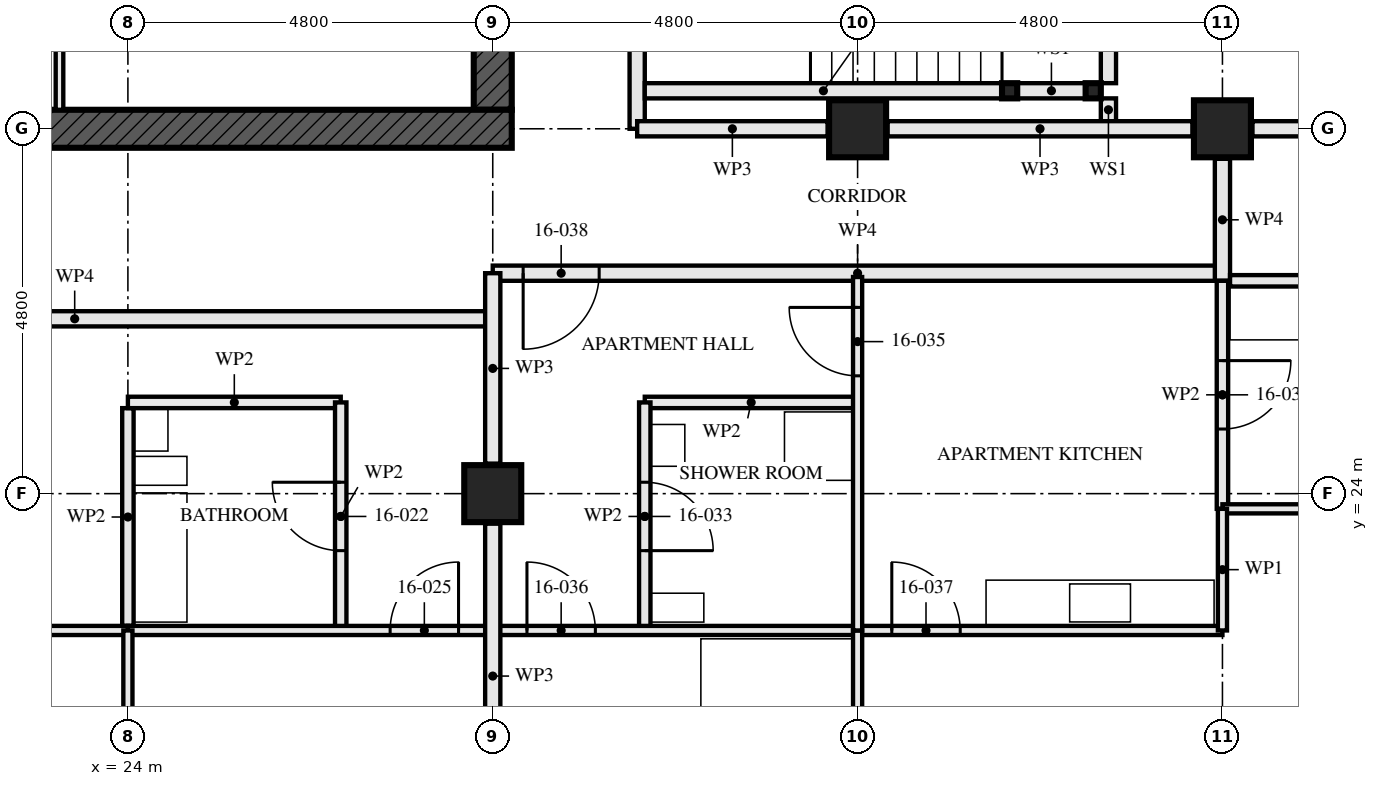
"""IFC4 building model, lengths in metres.
Left out: names, types, materials, properties, quantities, classifications, styles, units other than length and angle.
Written with IfcOpenShell. Run it as: python <this file> out.ifc"""

import sys

from ifc_helpers import new_model, si_unit, direction, frame, frame_2d, origin, origin_2d, place, context, subcontext, project, spatial, rectangle, hollow_rectangle, extrude, element, fill, save


model = new_model("IFC4")
c1 = context("Model", 3, precision=1e-05, world=origin(), true_north=direction((0.0, 1.0)))
c2 = subcontext(c1, "Body", "Model", "MODEL_VIEW")
j1 = project(units=[si_unit("LENGTHUNIT", "METRE"), si_unit("PLANEANGLEUNIT", "RADIAN")], contexts=[c1])
p1 = place(None, origin())
s1 = spatial("IfcSite", under=j1, at=p1, CompositionType="ELEMENT")
p2 = place(p1, origin())
s2 = spatial("IfcBuilding", under=s1, at=p2, CompositionType="ELEMENT")
p3 = place(p2, frame((0.0, 0.0, 62.0)))
s3 = spatial("IfcBuildingStorey", under=s2, at=p3, CompositionType="ELEMENT", Elevation=62.0)
for number, where, z_axis, x_axis in (
    (1, (28.8, 24.0, 0.0), (0.0, 0.0, 1.0), (1.0, 0.0, 0.0)),
    (2, (33.6, 28.8, 0.0), (0.0, 0.0, 1.0), (0.0, 1.0, 0.0)),
    (3, (38.4, 28.8, 0.0), (0.0, 0.0, 1.0), (0.0, 1.0, 0.0)),
):
    element("IfcColumn", number, at=place(p3, frame(where, z_axis=z_axis, x_axis=x_axis)), inside=s3, PredefinedType="COLUMN", context=c2, shape_type="SweptSolid", body=[
        extrude(hollow_rectangle(XDim=0.75, YDim=0.75, WallThickness=0.08, at=origin_2d()), origin(), (0.0, 0.0, 1.0), 3.5),
    ])
p4 = place(p3, frame((14.15, 28.8, -0.17), z_axis=(0.0, 0.0, 1.0), x_axis=(1.0, 0.0, 0.0)))
e4 = element("IfcWall", 4, at=p4, inside=s3, PredefinedType="SHEAR", context=c2, shape_type="SweptSolid", body=[
    extrude(rectangle(XDim=14.9, YDim=0.5, at=frame_2d((7.45, 0.0))), origin(), (0.0, 0.0, 1.0), 3.5),
])
p5 = place(p4, frame((6.85, 0.0, 0.17)))
e5 = element("IfcOpeningElement", 5, at=p5, cuts=e4, PredefinedType="OPENING", context=c2, shape_type="SweptSolid", body=[
    extrude(rectangle(XDim=1.2, YDim=2.1, at=frame_2d((0.6, 1.05))), frame((0.0, 0.26, 0.0), z_axis=(0.0, -1.0, 0.0), x_axis=(1.0, 0.0, 0.0)), (0.0, 0.0, 1.0), 0.521),
])
p6 = place(p3, frame((28.8, 29.05, -0.17), z_axis=(0.0, 0.0, 1.0), x_axis=(0.0, 1.0, 0.0)))
e6 = element("IfcWall", 6, at=p6, inside=s3, PredefinedType="SHEAR", context=c2, shape_type="SweptSolid", body=[
    extrude(rectangle(XDim=13.9, YDim=0.5, at=frame_2d((6.95, 0.0))), origin(), (0.0, 0.0, 1.0), 3.5),
])
p7 = place(p6, frame((6.35, 0.0, 0.17)))
e7 = element("IfcOpeningElement", 7, at=p7, cuts=e6, PredefinedType="OPENING", context=c2, shape_type="SweptSolid", body=[
    extrude(rectangle(XDim=1.2, YDim=2.1, at=frame_2d((0.6, 1.05))), frame((0.0, 0.26, 0.0), z_axis=(0.0, -1.0, 0.0), x_axis=(1.0, 0.0, 0.0)), (0.0, 0.0, 1.0), 0.521),
])
for number, where, z_axis, x_axis in (
    (8, (36.7, 29.3, 0.0), (0.0, 0.0, 1.0), (1.0, 0.0, 0.0)),
    (9, (35.6, 29.3, 0.0), (0.0, 0.0, 1.0), (1.0, 0.0, 0.0)),
):
    element("IfcColumn", number, at=place(p3, frame(where, z_axis=z_axis, x_axis=x_axis)), inside=s3, PredefinedType="COLUMN", context=c2, shape_type="SweptSolid", body=[
        extrude(hollow_rectangle(XDim=0.2, YDim=0.2, WallThickness=0.008, at=origin_2d()), origin(), (0.0, 0.0, 1.0), 3.33),
    ])
p8 = place(p3, frame((26.8, 22.2, 0.0), z_axis=(0.0, 0.0, 1.0), x_axis=(0.0, 1.0, 0.0)))
e10 = element("IfcWall", 10, at=p8, inside=s3, PredefinedType="PARTITIONING", context=c2, shape_type="SweptSolid", body=[
    extrude(rectangle(XDim=3.0, YDim=0.15, at=frame_2d((1.5, 0.0))), origin(), (0.0, 0.0, 1.0), 2.55),
])
p9 = place(p8, frame((1.05, 0.0, 0.0)))
e11 = element("IfcOpeningElement", 11, at=p9, cuts=e10, PredefinedType="OPENING", context=c2, shape_type="SweptSolid", body=[
    extrude(rectangle(XDim=0.9, YDim=2.1, at=frame_2d((0.45, 1.05))), frame((0.0, 0.085, 0.0), z_axis=(0.0, -1.0, 0.0), x_axis=(1.0, 0.0, 0.0)), (0.0, 0.0, 1.0), 0.171),
])
p10 = place(p3, frame((24.0, 25.2, 0.0), z_axis=(0.0, 0.0, 1.0), x_axis=(1.0, 0.0, 0.0)))
e12 = element("IfcWall", 12, at=p10, inside=s3, PredefinedType="PARTITIONING", context=c2, shape_type="SweptSolid", body=[
    extrude(rectangle(XDim=2.8, YDim=0.15, at=frame_2d((1.4, 0.0))), origin(), (0.0, 0.0, 1.0), 3.33),
])
p11 = place(p3, frame((19.2, 22.2, 0.0), z_axis=(0.0, 0.0, 1.0), x_axis=(1.0, 0.0, 0.0)))
e13 = element("IfcWall", 13, at=p11, inside=s3, PredefinedType="PARTITIONING", context=c2, shape_type="SweptSolid", body=[
    extrude(rectangle(XDim=4.8, YDim=0.12, at=frame_2d((2.4, 0.0))), origin(), (0.0, 0.0, 1.0), 3.33),
])
p12 = place(p11, frame((0.45, 0.0, 0.0)))
e14 = element("IfcOpeningElement", 14, at=p12, cuts=e13, PredefinedType="OPENING", context=c2, shape_type="SweptSolid", body=[
    extrude(rectangle(XDim=0.9, YDim=2.1, at=frame_2d((0.45, 1.05))), frame((0.0, 0.071, 0.0), z_axis=(0.0, -1.0, 0.0), x_axis=(1.0, 0.0, 0.0)), (0.0, 0.0, 1.0), 0.141),
])
p13 = place(p3, frame((24.0, 22.2, 0.0), z_axis=(0.0, 0.0, 1.0), x_axis=(1.0, 0.0, 0.0)))
e15 = element("IfcWall", 15, at=p13, inside=s3, PredefinedType="PARTITIONING", context=c2, shape_type="SweptSolid", body=[
    extrude(rectangle(XDim=4.8, YDim=0.12, at=frame_2d((2.4, 0.0))), origin(), (0.0, 0.0, 1.0), 3.33),
])
p14 = place(p13, frame((3.45, 0.0, 0.0)))
e16 = element("IfcOpeningElement", 16, at=p14, cuts=e15, PredefinedType="OPENING", context=c2, shape_type="SweptSolid", body=[
    extrude(rectangle(XDim=0.9, YDim=2.1, at=frame_2d((0.45, 1.05))), frame((0.0, 0.071, 0.0), z_axis=(0.0, -1.0, 0.0), x_axis=(1.0, 0.0, 0.0)), (0.0, 0.0, 1.0), 0.141),
])
p15 = place(p3, frame((24.0, 14.795, 0.0), z_axis=(0.0, 0.0, 1.0), x_axis=(0.0, 1.0, 0.0)))
e17 = element("IfcWall", 17, at=p15, inside=s3, PredefinedType="PARTITIONING", context=c2, shape_type="SweptSolid", body=[
    extrude(rectangle(XDim=7.405, YDim=0.12, at=frame_2d((3.703, 0.0))), origin(), (0.0, 0.0, 1.0), 2.55),
])
p16 = place(p3, frame((17.8, 26.3, 0.0), z_axis=(0.0, 0.0, 1.0), x_axis=(1.0, 0.0, 0.0)))
e18 = element("IfcWall", 18, at=p16, inside=s3, PredefinedType="PARTITIONING", context=c2, shape_type="SweptSolid", body=[
    extrude(rectangle(XDim=11.0, YDim=0.2, at=frame_2d((5.5, 0.0))), origin(), (0.0, 0.0, 1.0), 2.55),
])
p17 = place(p16, frame((0.06, 0.0, 0.0)))
e19 = element("IfcOpeningElement", 19, at=p17, cuts=e18, PredefinedType="OPENING", context=c2, shape_type="SweptSolid", body=[
    extrude(rectangle(XDim=1.0, YDim=2.1, at=frame_2d((0.5, 1.05))), frame((0.0, 0.111, 0.0), z_axis=(0.0, -1.0, 0.0), x_axis=(1.0, 0.0, 0.0)), (0.0, 0.0, 1.0), 0.221),
])
p18 = place(p3, frame((30.8, 22.2, 0.0), z_axis=(0.0, 0.0, 1.0), x_axis=(0.0, 1.0, 0.0)))
e20 = element("IfcWall", 20, at=p18, inside=s3, PredefinedType="PARTITIONING", context=c2, shape_type="SweptSolid", body=[
    extrude(rectangle(XDim=3.0, YDim=0.15, at=frame_2d((1.5, 0.0))), origin(), (0.0, 0.0, 1.0), 2.55),
])
p19 = place(p18, frame((1.05, 0.0, 0.0)))
e21 = element("IfcOpeningElement", 21, at=p19, cuts=e20, PredefinedType="OPENING", context=c2, shape_type="SweptSolid", body=[
    extrude(rectangle(XDim=0.9, YDim=2.1, at=frame_2d((0.45, 1.05))), frame((0.0, 0.085, 0.0), z_axis=(0.0, -1.0, 0.0), x_axis=(1.0, 0.0, 0.0)), (0.0, 0.0, 1.0), 0.171),
])
p20 = place(p3, frame((30.8, 25.2, 0.0), z_axis=(0.0, 0.0, 1.0), x_axis=(1.0, 0.0, 0.0)))
e22 = element("IfcWall", 22, at=p20, inside=s3, PredefinedType="PARTITIONING", context=c2, shape_type="SweptSolid", body=[
    extrude(rectangle(XDim=2.8, YDim=0.15, at=frame_2d((1.4, 0.0))), origin(), (0.0, 0.0, 1.0), 3.33),
])
p21 = place(p3, frame((38.4, 23.8, 0.0), z_axis=(0.0, 0.0, 1.0), x_axis=(0.0, 1.0, 0.0)))
e23 = element("IfcWall", 23, at=p21, inside=s3, PredefinedType="PARTITIONING", context=c2, shape_type="SweptSolid", body=[
    extrude(rectangle(XDim=3.0, YDim=0.15, at=frame_2d((1.5, 0.0))), origin(), (0.0, 0.0, 1.0), 2.55),
])
p22 = place(p21, frame((1.05, 0.0, 0.0)))
e24 = element("IfcOpeningElement", 24, at=p22, cuts=e23, PredefinedType="OPENING", context=c2, shape_type="SweptSolid", body=[
    extrude(rectangle(XDim=0.9, YDim=2.1, at=frame_2d((0.45, 1.05))), frame((0.0, 0.085, 0.0), z_axis=(0.0, -1.0, 0.0), x_axis=(1.0, 0.0, 0.0)), (0.0, 0.0, 1.0), 0.171),
])
p23 = place(p3, frame((33.6, 22.2, 0.0), z_axis=(0.0, 0.0, 1.0), x_axis=(0.0, 1.0, 0.0)))
e25 = element("IfcWall", 25, at=p23, inside=s3, PredefinedType="PARTITIONING", context=c2, shape_type="SweptSolid", body=[
    extrude(rectangle(XDim=4.65, YDim=0.12, at=frame_2d((2.325, 0.0))), origin(), (0.0, 0.0, 1.0), 2.55),
])
p24 = place(p23, frame((3.35, 0.0, 0.0)))
e26 = element("IfcOpeningElement", 26, at=p24, cuts=e25, PredefinedType="OPENING", context=c2, shape_type="SweptSolid", body=[
    extrude(rectangle(XDim=0.9, YDim=2.1, at=frame_2d((0.45, 1.05))), frame((0.0, 0.071, 0.0), z_axis=(0.0, -1.0, 0.0), x_axis=(1.0, 0.0, 0.0)), (0.0, 0.0, 1.0), 0.141),
])
p25 = place(p3, frame((28.8, 22.2, 0.0), z_axis=(0.0, 0.0, 1.0), x_axis=(1.0, 0.0, 0.0)))
e27 = element("IfcWall", 27, at=p25, inside=s3, PredefinedType="PARTITIONING", context=c2, shape_type="SweptSolid", body=[
    extrude(rectangle(XDim=4.8, YDim=0.12, at=frame_2d((2.4, 0.0))), origin(), (0.0, 0.0, 1.0), 3.33),
])
p26 = place(p25, frame((0.45, 0.0, 0.0)))
e28 = element("IfcOpeningElement", 28, at=p26, cuts=e27, PredefinedType="OPENING", context=c2, shape_type="SweptSolid", body=[
    extrude(rectangle(XDim=0.9, YDim=2.1, at=frame_2d((0.45, 1.05))), frame((0.0, 0.071, 0.0), z_axis=(0.0, -1.0, 0.0), x_axis=(1.0, 0.0, 0.0)), (0.0, 0.0, 1.0), 0.141),
])
p27 = place(p3, frame((33.6, 22.2, 0.0), z_axis=(0.0, 0.0, 1.0), x_axis=(1.0, 0.0, 0.0)))
e29 = element("IfcWall", 29, at=p27, inside=s3, PredefinedType="PARTITIONING", context=c2, shape_type="SweptSolid", body=[
    extrude(rectangle(XDim=4.8, YDim=0.12, at=frame_2d((2.4, 0.0))), origin(), (0.0, 0.0, 1.0), 3.33),
])
p28 = place(p27, frame((0.45, 0.0, 0.0)))
e30 = element("IfcOpeningElement", 30, at=p28, cuts=e29, PredefinedType="OPENING", context=c2, shape_type="SweptSolid", body=[
    extrude(rectangle(XDim=0.9, YDim=2.1, at=frame_2d((0.45, 1.05))), frame((0.0, 0.071, 0.0), z_axis=(0.0, -1.0, 0.0), x_axis=(1.0, 0.0, 0.0)), (0.0, 0.0, 1.0), 0.141),
])
p29 = place(p3, frame((38.4, 23.8, 0.0), z_axis=(0.0, 0.0, 1.0), x_axis=(1.0, 0.0, 0.0)))
e31 = element("IfcWall", 31, at=p29, inside=s3, PredefinedType="PARTITIONING", context=c2, shape_type="SweptSolid", body=[
    extrude(rectangle(XDim=4.48, YDim=0.12, at=frame_2d((2.24, 0.0))), origin(), (0.0, 0.0, 1.0), 3.33),
])
p30 = place(p3, frame((33.6, 14.72, 0.0), z_axis=(0.0, 0.0, 1.0), x_axis=(0.0, 1.0, 0.0)))
e32 = element("IfcWall", 32, at=p30, inside=s3, PredefinedType="PARTITIONING", context=c2, shape_type="SweptSolid", body=[
    extrude(rectangle(XDim=7.48, YDim=0.12, at=frame_2d((3.74, 0.0))), origin(), (0.0, 0.0, 1.0), 2.55),
])
p31 = place(p3, frame((38.4, 22.2, 0.0), z_axis=(0.0, 0.0, 1.0), x_axis=(0.0, 1.0, 0.0)))
e33 = element("IfcWall", 33, at=p31, inside=s3, PredefinedType="PARTITIONING", context=c2, shape_type="SweptSolid", body=[
    extrude(rectangle(XDim=1.6, YDim=0.12, at=frame_2d((0.8, 0.0))), origin(), (0.0, 0.0, 1.0), 3.33),
])
p32 = place(p3, frame((28.8, 26.9, 0.0), z_axis=(0.0, 0.0, 1.0), x_axis=(1.0, 0.0, 0.0)))
e34 = element("IfcWall", 34, at=p32, inside=s3, PredefinedType="PARTITIONING", context=c2, shape_type="SweptSolid", body=[
    extrude(rectangle(XDim=9.6, YDim=0.2, at=frame_2d((4.8, 0.0))), origin(), (0.0, 0.0, 1.0), 3.33),
])
p33 = place(p32, frame((0.4, 0.0, 0.0)))
e35 = element("IfcOpeningElement", 35, at=p33, cuts=e34, PredefinedType="OPENING", context=c2, shape_type="SweptSolid", body=[
    extrude(rectangle(XDim=1.0, YDim=2.1, at=frame_2d((0.5, 1.05))), frame((0.0, 0.111, 0.0), z_axis=(0.0, -1.0, 0.0), x_axis=(1.0, 0.0, 0.0)), (0.0, 0.0, 1.0), 0.221),
])
p34 = place(p3, frame((38.4, 26.8, 0.0), z_axis=(0.0, 0.0, 1.0), x_axis=(0.0, 1.0, 0.0)))
e36 = element("IfcWall", 36, at=p34, inside=s3, PredefinedType="PARTITIONING", context=c2, shape_type="SweptSolid", body=[
    extrude(rectangle(XDim=1.605, YDim=0.2, at=frame_2d((0.802, 0.0))), origin(), (0.0, 0.0, 1.0), 3.33),
])
p35 = place(p3, frame((36.6, 29.3, 0.0), z_axis=(0.0, 0.0, 1.0), x_axis=(-1.0, 0.0, 0.0)))
e37 = element("IfcWall", 37, at=p35, inside=s3, PredefinedType="SOLIDWALL", context=c2, shape_type="SweptSolid", body=[
    extrude(rectangle(XDim=0.9, YDim=0.2, at=frame_2d((0.45, 0.0))), origin(), (0.0, 0.0, 1.0), 2.99),
])
p36 = place(p3, frame((35.5, 29.3, 0.0), z_axis=(0.0, 0.0, 1.0), x_axis=(-1.0, 0.0, 0.0)))
e38 = element("IfcWall", 38, at=p36, inside=s3, PredefinedType="SOLIDWALL", context=c2, shape_type="SweptSolid", body=[
    extrude(rectangle(XDim=4.7, YDim=0.2, at=frame_2d((2.35, 0.0))), origin(), (0.0, 0.0, 1.0), 2.99),
])
p37 = place(p3, frame((36.9, 28.9, 0.0), z_axis=(0.0, 0.0, 1.0), x_axis=(0.0, 1.0, 0.0)))
e39 = element("IfcWall", 39, at=p37, inside=s3, PredefinedType="SOLIDWALL", context=c2, shape_type="SweptSolid", body=[
    extrude(rectangle(XDim=0.3, YDim=0.2, at=frame_2d((0.15, 0.0))), origin(), (0.0, 0.0, 1.0), 3.33),
])
p38 = place(p3, frame((36.9, 29.4, 0.0), z_axis=(0.0, 0.0, 1.0), x_axis=(0.0, 1.0, 0.0)))
e40 = element("IfcWall", 40, at=p38, inside=s3, PredefinedType="SOLIDWALL", context=c2, shape_type="SweptSolid", body=[
    extrude(rectangle(XDim=2.6, YDim=0.2, at=frame_2d((1.3, 0.0))), origin(), (0.0, 0.0, 1.0), 3.33),
])
p39 = place(p3, frame((30.7, 28.8, 0.0), z_axis=(0.0, 0.0, 1.0), x_axis=(0.0, 1.0, 0.0)))
e41 = element("IfcWall", 41, at=p39, inside=s3, PredefinedType="PARTITIONING", context=c2, shape_type="SweptSolid", body=[
    extrude(rectangle(XDim=14.4, YDim=0.2, at=frame_2d((7.2, 0.0))), origin(), (0.0, 0.0, 1.0), 2.55),
])
p40 = place(p39, frame((1.4, 0.0, 0.0)))
e42 = element("IfcOpeningElement", 42, at=p40, cuts=e41, PredefinedType="OPENING", context=c2, shape_type="SweptSolid", body=[
    extrude(rectangle(XDim=1.0, YDim=2.1, at=frame_2d((0.5, 1.05))), frame((0.0, 0.111, 0.0), z_axis=(0.0, -1.0, 0.0), x_axis=(1.0, 0.0, 0.0)), (0.0, 0.0, 1.0), 0.221),
])
p41 = place(p39, frame((4.1, 0.0, 0.0)))
e43 = element("IfcOpeningElement", 43, at=p41, cuts=e41, PredefinedType="OPENING", context=c2, shape_type="SweptSolid", body=[
    extrude(rectangle(XDim=1.0, YDim=2.1, at=frame_2d((0.5, 1.05))), frame((0.0, 0.111, 0.0), z_axis=(0.0, -1.0, 0.0), x_axis=(1.0, 0.0, 0.0)), (0.0, 0.0, 1.0), 0.221),
])
p42 = place(p39, frame((10.0, 0.0, 0.0)))
e44 = element("IfcOpeningElement", 44, at=p42, cuts=e41, PredefinedType="OPENING", context=c2, shape_type="SweptSolid", body=[
    extrude(rectangle(XDim=1.0, YDim=2.1, at=frame_2d((0.5, 1.05))), frame((0.0, 0.111, 0.0), z_axis=(0.0, -1.0, 0.0), x_axis=(1.0, 0.0, 0.0)), (0.0, 0.0, 1.0), 0.221),
])
p43 = place(p3, frame((23.1, 29.05, 0.0), z_axis=(0.0, 0.0, 1.0), x_axis=(0.0, 1.0, 0.0)))
e45 = element("IfcWall", 45, at=p43, inside=s3, PredefinedType="SOLIDWALL", context=c2, shape_type="SweptSolid", body=[
    extrude(rectangle(XDim=5.8, YDim=0.1, at=frame_2d((2.9, 0.0))), origin(), (0.0, 0.0, 1.0), 3.33),
])
p44 = place(p43, frame((1.0, 0.0, 0.0)))
e46 = element("IfcOpeningElement", 46, at=p44, cuts=e45, PredefinedType="OPENING", context=c2, shape_type="SweptSolid", body=[
    extrude(rectangle(XDim=0.7, YDim=2.1, at=frame_2d((0.35, 1.05))), frame((0.0, 0.061, 0.0), z_axis=(0.0, -1.0, 0.0), x_axis=(1.0, 0.0, 0.0)), (0.0, 0.0, 1.0), 0.121),
])
p45 = place(p3, frame((28.8, 19.595, 0.0), z_axis=(0.0, 0.0, 1.0), x_axis=(0.0, 1.0, 0.0)))
e47 = element("IfcWall", 47, at=p45, inside=s3, PredefinedType="PARTITIONING", context=c2, shape_type="SweptSolid", body=[
    extrude(rectangle(XDim=4.01, YDim=0.2, at=frame_2d((2.005, 0.0))), origin(), (0.0, 0.0, 1.0), 2.32),
])
p46 = place(p3, frame((28.8, 24.395, 0.0), z_axis=(0.0, 0.0, 1.0), x_axis=(0.0, 1.0, 0.0)))
e48 = element("IfcWall", 48, at=p46, inside=s3, PredefinedType="PARTITIONING", context=c2, shape_type="SweptSolid", body=[
    extrude(rectangle(XDim=2.505, YDim=0.2, at=frame_2d((1.252, 0.0))), origin(), (0.0, 0.0, 1.0), 2.32),
])
p47 = place(p3, frame((42.88, 28.8, 0.0), z_axis=(0.0, 0.0, 1.0), x_axis=(-1.0, 0.0, 0.0)))
e49 = element("IfcWall", 49, at=p47, inside=s3, PredefinedType="PARTITIONING", context=c2, shape_type="SweptSolid", body=[
    extrude(rectangle(XDim=4.085, YDim=0.2, at=frame_2d((2.042, 0.0))), origin(), (0.0, 0.0, 1.0), 2.32),
])
p48 = place(p3, frame((38.005, 28.8, 0.0), z_axis=(0.0, 0.0, 1.0), x_axis=(-1.0, 0.0, 0.0)))
e50 = element("IfcWall", 50, at=p48, inside=s3, PredefinedType="PARTITIONING", context=c2, shape_type="SweptSolid", body=[
    extrude(rectangle(XDim=4.01, YDim=0.2, at=frame_2d((2.005, 0.0))), origin(), (0.0, 0.0, 1.0), 2.32),
])
p49 = place(p3, frame((33.205, 28.8, 0.0), z_axis=(0.0, 0.0, 1.0), x_axis=(-1.0, 0.0, 0.0)))
e51 = element("IfcWall", 51, at=p49, inside=s3, PredefinedType="PARTITIONING", context=c2, shape_type="SweptSolid", body=[
    extrude(rectangle(XDim=2.505, YDim=0.2, at=frame_2d((1.252, 0.0))), origin(), (0.0, 0.0, 1.0), 2.32),
])
p50 = place(p3, frame((24.0, 22.26, 0.0), z_axis=(0.0, 0.0, 1.0), x_axis=(0.0, 1.0, 0.0)))
e52 = element("IfcWall", 52, at=p50, inside=s3, PredefinedType="PARTITIONING", context=c2, shape_type="SweptSolid", body=[
    extrude(rectangle(XDim=2.865, YDim=0.15, at=frame_2d((1.433, 0.0))), origin(), (0.0, 0.0, 1.0), 2.55),
])
p51 = place(p3, frame((38.5, 26.8, 0.0), z_axis=(0.0, 0.0, 1.0), x_axis=(1.0, 0.0, 0.0)))
e53 = element("IfcWall", 53, at=p51, inside=s3, PredefinedType="PARTITIONING", context=c2, shape_type="SweptSolid", body=[
    extrude(rectangle(XDim=5.13, YDim=0.15, at=frame_2d((2.565, 0.0))), origin(), (0.0, 0.0, 1.0), 2.32),
])
p52 = place(p9, origin())
e54 = element("IfcDoor", 54, at=p52, inside=s3, OperationType="SINGLE_SWING_LEFT", PredefinedType="DOOR", context=c2, shape_type="SweptSolid", body=[
    extrude(rectangle(XDim=0.9, YDim=2.1, at=frame_2d((0.45, 1.05))), frame((0.0, 0.022, 0.0), z_axis=(0.0, -1.0, 0.0), x_axis=(1.0, 0.0, 0.0)), (0.0, 0.0, 1.0), 0.044),
])
fill(e11, e54)
p53 = place(p14, origin())
e55 = element("IfcDoor", 55, at=p53, inside=s3, OperationType="SINGLE_SWING_LEFT", PredefinedType="DOOR", context=c2, shape_type="SweptSolid", body=[
    extrude(rectangle(XDim=0.9, YDim=2.1, at=frame_2d((0.45, 1.05))), frame((0.0, 0.022, 0.0), z_axis=(0.0, -1.0, 0.0), x_axis=(1.0, 0.0, 0.0)), (0.0, 0.0, 1.0), 0.044),
])
fill(e16, e55)
p54 = place(p19, frame((0.9, 0.0, 0.0), z_axis=(0.0, 0.0, 1.0), x_axis=(-1.0, 0.0, 0.0)))
e56 = element("IfcDoor", 56, at=p54, inside=s3, OperationType="SINGLE_SWING_LEFT", PredefinedType="DOOR", context=c2, shape_type="SweptSolid", body=[
    extrude(rectangle(XDim=0.9, YDim=2.1, at=frame_2d((0.45, 1.05))), frame((0.0, 0.022, 0.0), z_axis=(0.0, -1.0, 0.0), x_axis=(1.0, 0.0, 0.0)), (0.0, 0.0, 1.0), 0.044),
])
fill(e21, e56)
p55 = place(p22, frame((0.9, 0.0, 0.0), z_axis=(0.0, 0.0, 1.0), x_axis=(-1.0, 0.0, 0.0)))
e57 = element("IfcDoor", 57, at=p55, inside=s3, OperationType="SINGLE_SWING_RIGHT", PredefinedType="DOOR", context=c2, shape_type="SweptSolid", body=[
    extrude(rectangle(XDim=0.9, YDim=2.1, at=frame_2d((0.45, 1.05))), frame((0.0, 0.022, 0.0), z_axis=(0.0, -1.0, 0.0), x_axis=(1.0, 0.0, 0.0)), (0.0, 0.0, 1.0), 0.044),
])
fill(e24, e57)
p56 = place(p24, origin())
e58 = element("IfcDoor", 58, at=p56, inside=s3, OperationType="SINGLE_SWING_LEFT", PredefinedType="DOOR", context=c2, shape_type="SweptSolid", body=[
    extrude(rectangle(XDim=0.9, YDim=2.1, at=frame_2d((0.45, 1.05))), frame((0.0, 0.022, 0.0), z_axis=(0.0, -1.0, 0.0), x_axis=(1.0, 0.0, 0.0)), (0.0, 0.0, 1.0), 0.044),
])
fill(e26, e58)
p57 = place(p26, origin())
e59 = element("IfcDoor", 59, at=p57, inside=s3, OperationType="SINGLE_SWING_RIGHT", PredefinedType="DOOR", context=c2, shape_type="SweptSolid", body=[
    extrude(rectangle(XDim=0.9, YDim=2.1, at=frame_2d((0.45, 1.05))), frame((0.0, 0.022, 0.0), z_axis=(0.0, -1.0, 0.0), x_axis=(1.0, 0.0, 0.0)), (0.0, 0.0, 1.0), 0.044),
])
fill(e28, e59)
p58 = place(p28, origin())
e60 = element("IfcDoor", 60, at=p58, inside=s3, OperationType="SINGLE_SWING_RIGHT", PredefinedType="DOOR", context=c2, shape_type="SweptSolid", body=[
    extrude(rectangle(XDim=0.9, YDim=2.1, at=frame_2d((0.45, 1.05))), frame((0.0, 0.022, 0.0), z_axis=(0.0, -1.0, 0.0), x_axis=(1.0, 0.0, 0.0)), (0.0, 0.0, 1.0), 0.044),
])
fill(e30, e60)
p59 = place(p33, frame((1.0, 0.0, 0.0), z_axis=(0.0, 0.0, 1.0), x_axis=(-1.0, 0.0, 0.0)))
e61 = element("IfcDoor", 61, at=p59, inside=s3, OperationType="SINGLE_SWING_LEFT", PredefinedType="DOOR", context=c2, shape_type="SweptSolid", body=[
    extrude(rectangle(XDim=1.0, YDim=2.1, at=frame_2d((0.5, 1.05))), frame((0.0, 0.027, 0.0), z_axis=(0.0, -1.0, 0.0), x_axis=(1.0, 0.0, 0.0)), (0.0, 0.0, 1.0), 0.054),
])
fill(e35, e61)
save(model, sys.argv[1])
